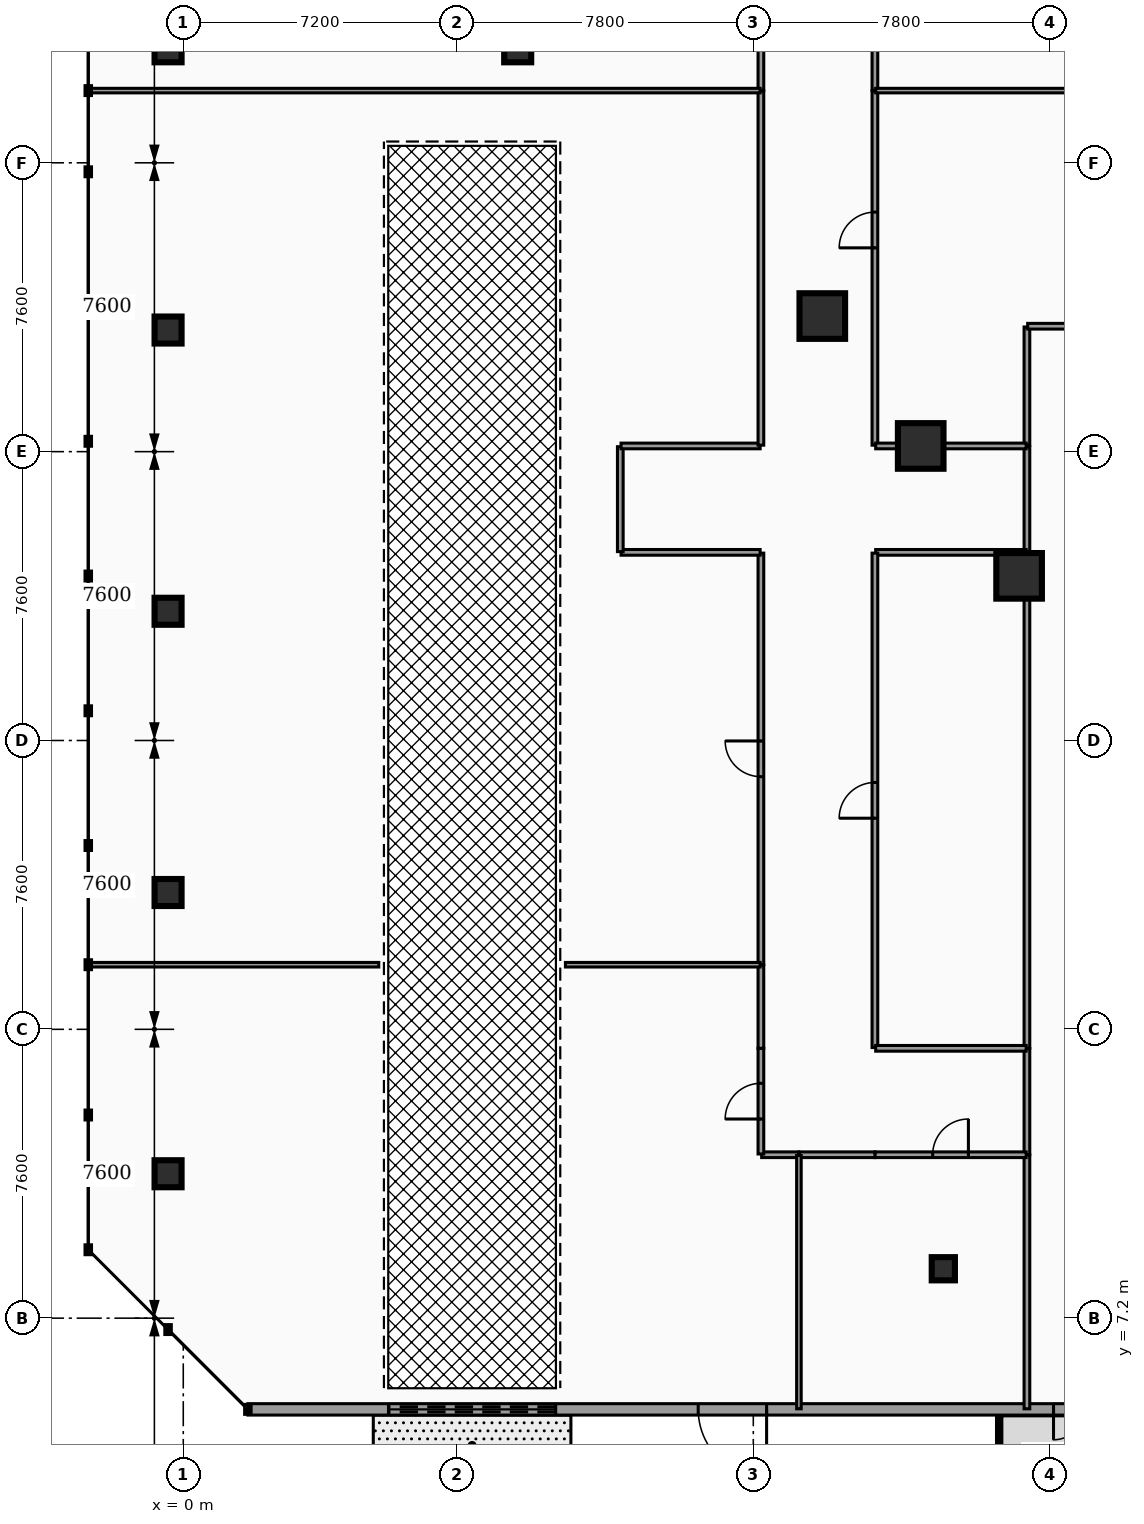
"""IFC4 building model, lengths in metres.
Left out: names, types, materials, properties, quantities, classifications, styles, units other than length and angle.
Written with IfcOpenShell. Run it as: python <this file> out.ifc"""

import sys

from ifc_helpers import new_model, si_unit, direction, frame, frame_2d, origin, origin_2d, place, context, subcontext, project, spatial, rectangle, hollow_rectangle, hollow_circle, extrude, element, fill, save


model = new_model("IFC4")
c1 = context("Model", 3, precision=1e-05, world=origin(), true_north=direction((0.0, 1.0)))
c2 = subcontext(c1, "Body", "Model", "MODEL_VIEW")
j1 = project(units=[si_unit("LENGTHUNIT", "METRE"), si_unit("PLANEANGLEUNIT", "RADIAN")], contexts=[c1])
p1 = place(None, origin())
s1 = spatial("IfcSite", under=j1, at=p1, CompositionType="ELEMENT")
p2 = place(p1, origin())
s2 = spatial("IfcBuilding", under=s1, at=p2, CompositionType="ELEMENT")
p3 = place(p2, origin())
s3 = spatial("IfcBuildingStorey", under=s2, at=p3, CompositionType="ELEMENT", Elevation=0.0)
for number, where, z_axis, x_axis in (
    (1, (16.815, 33.568, 0.0), (0.0, 0.0, 1.0), (1.0, 0.0, 0.0)),
    (2, (19.405, 30.15, 0.0), (0.0, 0.0, 1.0), (1.0, 0.0, 0.0)),
    (3, (21.994, 26.732, 0.0), (0.0, 0.0, 1.0), (1.0, 0.0, 0.0)),
):
    element("IfcColumn", number, at=place(p3, frame(where, z_axis=z_axis, x_axis=x_axis)), inside=s3, PredefinedType="COLUMN", context=c2, shape_type="SweptSolid", body=[
        extrude(hollow_rectangle(XDim=1.2, YDim=1.2, WallThickness=0.06, at=origin_2d()), origin(), (0.0, 0.0, 1.0), 4.82),
    ])
p4 = place(p3, frame((20.0, 8.5, 0.0), z_axis=(0.0, 0.0, 1.0), x_axis=(1.0, 0.0, 0.0)))
e4 = element("IfcColumn", 4, at=p4, inside=s3, PredefinedType="COLUMN", context=c2, shape_type="SweptSolid", body=[
    extrude(hollow_circle(Radius=0.305, WallThickness=0.025, at=origin_2d()), origin(), (0.0, 0.0, 1.0), 4.82),
])
for number, where, z_axis, x_axis in (
    (5, (-0.4, 40.6, 0.0), (0.0, 0.0, 1.0), (1.0, 0.0, 0.0)),
    (6, (8.8, 40.6, 0.0), (0.0, 0.0, 1.0), (1.0, 0.0, 0.0)),
    (7, (-0.4, 11.0, 0.0), (0.0, 0.0, 1.0), (1.0, 0.0, 0.0)),
    (8, (-0.4, 18.4, 0.0), (0.0, 0.0, 1.0), (1.0, 0.0, 0.0)),
    (9, (-0.4, 25.8, 0.0), (0.0, 0.0, 1.0), (1.0, 0.0, 0.0)),
    (10, (-0.4, 33.2, 0.0), (0.0, 0.0, 1.0), (1.0, 0.0, 0.0)),
):
    element("IfcColumn", number, at=place(p3, frame(where, z_axis=z_axis, x_axis=x_axis)), inside=s3, PredefinedType="COLUMN", context=c2, shape_type="SweptSolid", body=[
        extrude(hollow_circle(Radius=0.355, WallThickness=0.03, at=origin_2d()), origin(), (0.0, 0.0, 1.0), 4.82),
    ])
p5 = place(p3, frame((75.1, 4.8, 0.0), z_axis=(0.0, 0.0, 1.0), x_axis=(-1.0, 0.0, 0.0)))
e11 = element("IfcWall", 11, at=p5, inside=s3, PredefinedType="STANDARD", context=c2, shape_type="SweptSolid", body=[
    extrude(rectangle(XDim=73.4, YDim=0.3, at=frame_2d((36.7, 0.0))), origin(), (0.0, 0.0, 1.0), 4.205),
])
p6 = place(p5, frame((65.3, 0.0, 0.0)))
e12 = element("IfcOpeningElement", 12, at=p6, cuts=e11, PredefinedType="OPENING", context=c2, shape_type="SweptSolid", body=[
    extrude(rectangle(XDim=4.4, YDim=3.5, at=frame_2d((2.2, 1.75))), frame((0.0, 0.16, 0.0), z_axis=(0.0, -1.0, 0.0), x_axis=(1.0, 0.0, 0.0)), (0.0, 0.0, 1.0), 0.32),
])
p7 = place(p5, frame((31.15, 0.0, 0.0)))
e13 = element("IfcOpeningElement", 13, at=p7, cuts=e11, PredefinedType="OPENING", context=c2, shape_type="SweptSolid", body=[
    extrude(rectangle(XDim=2.4, YDim=2.6, at=frame_2d((1.2, 1.3))), frame((0.0, 0.16, 0.0), z_axis=(0.0, -1.0, 0.0), x_axis=(1.0, 0.0, 0.0)), (0.0, 0.0, 1.0), 0.32),
])
p8 = place(p5, frame((50.6, 0.0, 0.0)))
e14 = element("IfcOpeningElement", 14, at=p8, cuts=e11, PredefinedType="OPENING", context=c2, shape_type="SweptSolid", body=[
    extrude(rectangle(XDim=1.6, YDim=2.4, at=frame_2d((0.8, 1.2))), frame((0.0, 0.16, 0.0), z_axis=(0.0, -1.0, 0.0), x_axis=(1.0, 0.0, 0.0)), (0.0, 0.0, 1.0), 0.32),
])
p9 = place(p5, frame((23.0, 0.0, 0.0)))
e15 = element("IfcOpeningElement", 15, at=p9, cuts=e11, PredefinedType="OPENING", context=c2, shape_type="SweptSolid", body=[
    extrude(rectangle(XDim=1.6, YDim=2.4, at=frame_2d((0.8, 1.2))), frame((0.0, 0.16, 0.0), z_axis=(0.0, -1.0, 0.0), x_axis=(1.0, 0.0, 0.0)), (0.0, 0.0, 1.0), 0.32),
])
p10 = place(p5, frame((7.6, 0.0, 0.0)))
e16 = element("IfcOpeningElement", 16, at=p10, cuts=e11, PredefinedType="OPENING", context=c2, shape_type="SweptSolid", body=[
    extrude(rectangle(XDim=1.8, YDim=2.4, at=frame_2d((0.9, 1.2))), frame((0.0, 0.16, 0.0), z_axis=(0.0, -1.0, 0.0), x_axis=(1.0, 0.0, 0.0)), (0.0, 0.0, 1.0), 0.32),
])
p11 = place(p5, frame((17.1, 0.0, 0.0)))
e17 = element("IfcOpeningElement", 17, at=p11, cuts=e11, PredefinedType="OPENING", context=c2, shape_type="SweptSolid", body=[
    extrude(rectangle(XDim=1.8, YDim=2.4, at=frame_2d((0.9, 1.2))), frame((0.0, 0.16, 0.0), z_axis=(0.0, -1.0, 0.0), x_axis=(1.0, 0.0, 0.0)), (0.0, 0.0, 1.0), 0.32),
])
p12 = place(p5, frame((59.75, 0.0, 0.0)))
e18 = element("IfcOpeningElement", 18, at=p12, cuts=e11, PredefinedType="OPENING", context=c2, shape_type="SweptSolid", body=[
    extrude(rectangle(XDim=1.8, YDim=2.4, at=frame_2d((0.9, 1.2))), frame((0.0, 0.16, 0.0), z_axis=(0.0, -1.0, 0.0), x_axis=(1.0, 0.0, 0.0)), (0.0, 0.0, 1.0), 0.32),
])
p13 = place(p5, frame((13.6, 0.0, 0.9)))
e19 = element("IfcOpeningElement", 19, at=p13, cuts=e11, PredefinedType="OPENING", context=c2, shape_type="SweptSolid", body=[
    extrude(rectangle(XDim=2.4, YDim=2.5, at=frame_2d((1.2, 1.25))), frame((0.0, 0.16, 0.0), z_axis=(0.0, -1.0, 0.0), x_axis=(1.0, 0.0, 0.0)), (0.0, 0.0, 1.0), 0.32),
])
p14 = place(p5, frame((28.15, 0.0, 0.9)))
e20 = element("IfcOpeningElement", 20, at=p14, cuts=e11, PredefinedType="OPENING", context=c2, shape_type="SweptSolid", body=[
    extrude(rectangle(XDim=2.4, YDim=2.5, at=frame_2d((1.2, 1.25))), frame((0.0, 0.16, 0.0), z_axis=(0.0, -1.0, 0.0), x_axis=(1.0, 0.0, 0.0)), (0.0, 0.0, 1.0), 0.32),
])
p15 = place(p5, frame((44.1, 0.0, 0.9)))
e21 = element("IfcOpeningElement", 21, at=p15, cuts=e11, PredefinedType="OPENING", context=c2, shape_type="SweptSolid", body=[
    extrude(rectangle(XDim=2.4, YDim=2.5, at=frame_2d((1.2, 1.25))), frame((0.0, 0.16, 0.0), z_axis=(0.0, -1.0, 0.0), x_axis=(1.0, 0.0, 0.0)), (0.0, 0.0, 1.0), 0.32),
])
p16 = place(p3, frame((22.2, 11.505, 0.0), z_axis=(0.0, 0.0, 1.0), x_axis=(0.0, 1.0, 0.0)))
e22 = element("IfcWall", 22, at=p16, inside=s3, PredefinedType="PARTITIONING", context=c2, shape_type="SweptSolid", body=[
    extrude(rectangle(XDim=2.79, YDim=0.15, at=frame_2d((1.395, 0.0))), origin(), (0.0, 0.0, 1.0), 3.777),
])
p17 = place(p3, frame((22.2, 27.355, 0.0), z_axis=(0.0, 0.0, 1.0), x_axis=(0.0, 1.0, 0.0)))
e23 = element("IfcWall", 23, at=p17, inside=s3, PredefinedType="PARTITIONING", context=c2, shape_type="SweptSolid", body=[
    extrude(rectangle(XDim=2.775, YDim=0.15, at=frame_2d((1.387, 0.0))), origin(), (0.0, 0.0, 1.0), 3.777),
])
p18 = place(p3, frame((22.2, 30.17, 0.0), z_axis=(0.0, 0.0, 1.0), x_axis=(0.0, 1.0, 0.0)))
e24 = element("IfcWall", 24, at=p18, inside=s3, PredefinedType="PARTITIONING", context=c2, shape_type="SweptSolid", body=[
    extrude(rectangle(XDim=3.11, YDim=0.15, at=frame_2d((1.555, 0.0))), origin(), (0.0, 0.0, 1.0), 3.777),
])
p19 = place(p3, frame((22.22, 33.3, 0.0), z_axis=(0.0, 0.0, 1.0), x_axis=(1.0, 0.0, 0.0)))
e25 = element("IfcWall", 25, at=p19, inside=s3, PredefinedType="PARTITIONING", context=c2, shape_type="SweptSolid", body=[
    extrude(rectangle(XDim=2.995, YDim=0.15, at=frame_2d((1.498, 0.0))), origin(), (0.0, 0.0, 1.0), 3.777),
])
p20 = place(p3, frame((22.2, 14.305, 0.0), z_axis=(0.0, 0.0, 1.0), x_axis=(0.0, 1.0, 0.0)))
e26 = element("IfcWall", 26, at=p20, inside=s3, PredefinedType="PARTITIONING", context=c2, shape_type="SweptSolid", body=[
    extrude(rectangle(XDim=13.04, YDim=0.15, at=frame_2d((6.52, 0.0))), origin(), (0.0, 0.0, 1.0), 3.777),
])
p21 = place(p3, frame((22.2, 4.815, 0.0), z_axis=(0.0, 0.0, 1.0), x_axis=(0.0, 1.0, 0.0)))
e27 = element("IfcWall", 27, at=p21, inside=s3, PredefinedType="PARTITIONING", context=c2, shape_type="SweptSolid", body=[
    extrude(rectangle(XDim=6.68, YDim=0.15, at=frame_2d((3.34, 0.0))), origin(), (0.0, 0.0, 1.0), 3.777),
])
p22 = place(p3, frame((18.2, 30.17, 0.0), z_axis=(0.0, 0.0, 1.0), x_axis=(0.0, 1.0, 0.0)))
e28 = element("IfcWall", 28, at=p22, inside=s3, PredefinedType="PARTITIONING", context=c2, shape_type="SweptSolid", body=[
    extrude(rectangle(XDim=9.325, YDim=0.15, at=frame_2d((4.663, 0.0))), origin(), (0.0, 0.0, 1.0), 3.777),
])
p23 = place(p22, frame((5.192, 0.0, 0.0)))
e29 = element("IfcOpeningElement", 29, at=p23, cuts=e28, PredefinedType="OPENING", context=c2, shape_type="SweptSolid", body=[
    extrude(rectangle(XDim=0.94, YDim=2.05, at=frame_2d((0.47, 1.025))), frame((0.0, 0.085, 0.0), z_axis=(0.0, -1.0, 0.0), x_axis=(1.0, 0.0, 0.0)), (0.0, 0.0, 1.0), 0.17),
])
p24 = place(p3, frame((18.22, 30.15, 0.0), z_axis=(0.0, 0.0, 1.0), x_axis=(1.0, 0.0, 0.0)))
e30 = element("IfcWall", 30, at=p24, inside=s3, PredefinedType="PARTITIONING", context=c2, shape_type="SweptSolid", body=[
    extrude(rectangle(XDim=3.96, YDim=0.15, at=frame_2d((1.98, 0.0))), origin(), (0.0, 0.0, 1.0), 3.777),
])
p25 = place(p3, frame((18.2, 39.505, 0.0), z_axis=(0.0, 0.0, 1.0), x_axis=(0.0, 1.0, 0.0)))
e31 = element("IfcWall", 31, at=p25, inside=s3, PredefinedType="PARTITIONING", context=c2, shape_type="SweptSolid", body=[
    extrude(rectangle(XDim=4.025, YDim=0.15, at=frame_2d((2.013, 0.0))), origin(), (0.0, 0.0, 1.0), 3.777),
])
p26 = place(p3, frame((18.22, 27.35, 0.0), z_axis=(0.0, 0.0, 1.0), x_axis=(1.0, 0.0, 0.0)))
e32 = element("IfcWall", 32, at=p26, inside=s3, PredefinedType="PARTITIONING", context=c2, shape_type="SweptSolid", body=[
    extrude(rectangle(XDim=3.96, YDim=0.15, at=frame_2d((1.98, 0.0))), origin(), (0.0, 0.0, 1.0), 3.777),
])
p27 = place(p3, frame((18.2, 14.32, 0.0), z_axis=(0.0, 0.0, 1.0), x_axis=(0.0, 1.0, 0.0)))
e33 = element("IfcWall", 33, at=p27, inside=s3, PredefinedType="PARTITIONING", context=c2, shape_type="SweptSolid", body=[
    extrude(rectangle(XDim=13.01, YDim=0.15, at=frame_2d((6.505, 0.0))), origin(), (0.0, 0.0, 1.0), 3.777),
])
p28 = place(p27, frame((6.035, 0.0, 0.0)))
e34 = element("IfcOpeningElement", 34, at=p28, cuts=e33, PredefinedType="OPENING", context=c2, shape_type="SweptSolid", body=[
    extrude(rectangle(XDim=0.94, YDim=2.05, at=frame_2d((0.47, 1.025))), frame((0.0, 0.085, 0.0), z_axis=(0.0, -1.0, 0.0), x_axis=(1.0, 0.0, 0.0)), (0.0, 0.0, 1.0), 0.17),
])
p29 = place(p3, frame((18.22, 14.3, 0.0), z_axis=(0.0, 0.0, 1.0), x_axis=(1.0, 0.0, 0.0)))
e35 = element("IfcWall", 35, at=p29, inside=s3, PredefinedType="PARTITIONING", context=c2, shape_type="SweptSolid", body=[
    extrude(rectangle(XDim=3.96, YDim=0.15, at=frame_2d((1.98, 0.0))), origin(), (0.0, 0.0, 1.0), 3.777),
])
p30 = place(p3, frame((18.2, 11.5, 0.0), z_axis=(0.0, 0.0, 1.0), x_axis=(1.0, 0.0, 0.0)))
e36 = element("IfcWall", 36, at=p30, inside=s3, PredefinedType="PARTITIONING", context=c2, shape_type="SweptSolid", body=[
    extrude(rectangle(XDim=3.98, YDim=0.15, at=frame_2d((1.99, 0.0))), origin(), (0.0, 0.0, 1.0), 3.777),
])
p31 = place(p30, frame((1.52, 0.0, 0.0)))
e37 = element("IfcOpeningElement", 37, at=p31, cuts=e36, PredefinedType="OPENING", context=c2, shape_type="SweptSolid", body=[
    extrude(rectangle(XDim=0.94, YDim=2.05, at=frame_2d((0.47, 1.025))), frame((0.0, 0.085, 0.0), z_axis=(0.0, -1.0, 0.0), x_axis=(1.0, 0.0, 0.0)), (0.0, 0.0, 1.0), 0.17),
])
p32 = place(p3, frame((16.205, 11.5, 0.0), z_axis=(0.0, 0.0, 1.0), x_axis=(1.0, 0.0, 0.0)))
e38 = element("IfcWall", 38, at=p32, inside=s3, PredefinedType="PARTITIONING", context=c2, shape_type="SweptSolid", body=[
    extrude(rectangle(XDim=1.995, YDim=0.15, at=frame_2d((0.998, 0.0))), origin(), (0.0, 0.0, 1.0), 3.777),
])
p33 = place(p3, frame((15.22, 11.5, 0.0), z_axis=(0.0, 0.0, 1.0), x_axis=(1.0, 0.0, 0.0)))
e39 = element("IfcWall", 39, at=p33, inside=s3, PredefinedType="PARTITIONING", context=c2, shape_type="SweptSolid", body=[
    extrude(rectangle(XDim=0.975, YDim=0.15, at=frame_2d((0.488, 0.0))), origin(), (0.0, 0.0, 1.0), 3.777),
])
p34 = place(p3, frame((15.2, 11.52, 0.0), z_axis=(0.0, 0.0, 1.0), x_axis=(0.0, 1.0, 0.0)))
e40 = element("IfcWall", 40, at=p34, inside=s3, PredefinedType="PARTITIONING", context=c2, shape_type="SweptSolid", body=[
    extrude(rectangle(XDim=2.78, YDim=0.15, at=frame_2d((1.39, 0.0))), origin(), (0.0, 0.0, 1.0), 3.777),
])
p35 = place(p34, frame((0.92, 0.0, 0.0)))
e41 = element("IfcOpeningElement", 41, at=p35, cuts=e40, PredefinedType="OPENING", context=c2, shape_type="SweptSolid", body=[
    extrude(rectangle(XDim=0.94, YDim=2.05, at=frame_2d((0.47, 1.025))), frame((0.0, 0.085, 0.0), z_axis=(0.0, -1.0, 0.0), x_axis=(1.0, 0.0, 0.0)), (0.0, 0.0, 1.0), 0.17),
])
p36 = place(p3, frame((15.2, 14.3, 0.0), z_axis=(0.0, 0.0, 1.0), x_axis=(0.0, 1.0, 0.0)))
e42 = element("IfcWall", 42, at=p36, inside=s3, PredefinedType="PARTITIONING", context=c2, shape_type="SweptSolid", body=[
    extrude(rectangle(XDim=2.195, YDim=0.15, at=frame_2d((1.098, 0.0))), origin(), (0.0, 0.0, 1.0), 3.777),
])
p37 = place(p3, frame((15.2, 16.505, 0.0), z_axis=(0.0, 0.0, 1.0), x_axis=(0.0, 1.0, 0.0)))
e43 = element("IfcWall", 43, at=p37, inside=s3, PredefinedType="PARTITIONING", context=c2, shape_type="SweptSolid", body=[
    extrude(rectangle(XDim=10.825, YDim=0.15, at=frame_2d((5.413, 0.0))), origin(), (0.0, 0.0, 1.0), 3.777),
])
p38 = place(p37, frame((4.942, 0.0, 0.0)))
e44 = element("IfcOpeningElement", 44, at=p38, cuts=e43, PredefinedType="OPENING", context=c2, shape_type="SweptSolid", body=[
    extrude(rectangle(XDim=0.94, YDim=2.05, at=frame_2d((0.47, 1.025))), frame((0.0, 0.085, 0.0), z_axis=(0.0, -1.0, 0.0), x_axis=(1.0, 0.0, 0.0)), (0.0, 0.0, 1.0), 0.17),
])
p39 = place(p3, frame((11.52, 27.35, 0.0), z_axis=(0.0, 0.0, 1.0), x_axis=(1.0, 0.0, 0.0)))
e45 = element("IfcWall", 45, at=p39, inside=s3, PredefinedType="PARTITIONING", context=c2, shape_type="SweptSolid", body=[
    extrude(rectangle(XDim=3.66, YDim=0.15, at=frame_2d((1.83, 0.0))), origin(), (0.0, 0.0, 1.0), 3.777),
])
p40 = place(p3, frame((11.5, 27.37, 0.0), z_axis=(0.0, 0.0, 1.0), x_axis=(0.0, 1.0, 0.0)))
e46 = element("IfcWall", 46, at=p40, inside=s3, PredefinedType="PARTITIONING", context=c2, shape_type="SweptSolid", body=[
    extrude(rectangle(XDim=2.76, YDim=0.15, at=frame_2d((1.38, 0.0))), origin(), (0.0, 0.0, 1.0), 3.777),
])
p41 = place(p3, frame((11.52, 30.15, 0.0), z_axis=(0.0, 0.0, 1.0), x_axis=(1.0, 0.0, 0.0)))
e47 = element("IfcWall", 47, at=p41, inside=s3, PredefinedType="PARTITIONING", context=c2, shape_type="SweptSolid", body=[
    extrude(rectangle(XDim=3.66, YDim=0.15, at=frame_2d((1.83, 0.0))), origin(), (0.0, 0.0, 1.0), 3.777),
])
p42 = place(p3, frame((15.2, 30.17, 0.0), z_axis=(0.0, 0.0, 1.0), x_axis=(0.0, 1.0, 0.0)))
e48 = element("IfcWall", 48, at=p42, inside=s3, PredefinedType="PARTITIONING", context=c2, shape_type="SweptSolid", body=[
    extrude(rectangle(XDim=9.325, YDim=0.15, at=frame_2d((4.663, 0.0))), origin(), (0.0, 0.0, 1.0), 3.777),
])
p43 = place(p3, frame((15.2, 39.505, 0.0), z_axis=(0.0, 0.0, 1.0), x_axis=(0.0, 1.0, 0.0)))
e49 = element("IfcWall", 49, at=p43, inside=s3, PredefinedType="PARTITIONING", context=c2, shape_type="SweptSolid", body=[
    extrude(rectangle(XDim=4.045, YDim=0.15, at=frame_2d((2.022, 0.0))), origin(), (0.0, 0.0, 1.0), 3.777),
])
p44 = place(p43, frame((1.552, 0.0, 0.0)))
e50 = element("IfcOpeningElement", 50, at=p44, cuts=e49, PredefinedType="OPENING", context=c2, shape_type="SweptSolid", body=[
    extrude(rectangle(XDim=0.94, YDim=2.05, at=frame_2d((0.47, 1.025))), frame((0.0, 0.085, 0.0), z_axis=(0.0, -1.0, 0.0), x_axis=(1.0, 0.0, 0.0)), (0.0, 0.0, 1.0), 0.17),
])
p45 = place(p3, frame((18.22, 39.5, 0.0), z_axis=(0.0, 0.0, 1.0), x_axis=(1.0, 0.0, 0.0)))
e51 = element("IfcWall", 51, at=p45, inside=s3, PredefinedType="PARTITIONING", context=c2, shape_type="SweptSolid", body=[
    extrude(rectangle(XDim=6.995, YDim=0.12, at=frame_2d((3.498, 0.0))), origin(), (0.0, 0.0, 1.0), 3.777),
])
p46 = place(p3, frame((16.2, 4.815, 0.0), z_axis=(0.0, 0.0, 1.0), x_axis=(0.0, 1.0, 0.0)))
e52 = element("IfcWall", 52, at=p46, inside=s3, PredefinedType="PARTITIONING", context=c2, shape_type="SweptSolid", body=[
    extrude(rectangle(XDim=6.665, YDim=0.12, at=frame_2d((3.333, 0.0))), origin(), (0.0, 0.0, 1.0), 3.777),
])
p47 = place(p3, frame((-2.485, 16.5, 0.0), z_axis=(0.0, 0.0, 1.0), x_axis=(1.0, 0.0, 0.0)))
e53 = element("IfcWall", 53, at=p47, inside=s3, PredefinedType="PARTITIONING", context=c2, shape_type="SweptSolid", body=[
    extrude(rectangle(XDim=7.629, YDim=0.12, at=frame_2d((3.814, 0.0))), origin(), (0.0, 0.0, 1.0), 3.777),
])
p48 = place(p3, frame((10.056, 16.5, 0.0), z_axis=(0.0, 0.0, 1.0), x_axis=(1.0, 0.0, 0.0)))
e54 = element("IfcWall", 54, at=p48, inside=s3, PredefinedType="PARTITIONING", context=c2, shape_type="SweptSolid", body=[
    extrude(rectangle(XDim=5.124, YDim=0.12, at=frame_2d((2.562, 0.0))), origin(), (0.0, 0.0, 1.0), 3.777),
])
p49 = place(p3, frame((-2.485, 39.5, 0.0), z_axis=(0.0, 0.0, 1.0), x_axis=(1.0, 0.0, 0.0)))
e55 = element("IfcWall", 55, at=p49, inside=s3, PredefinedType="PARTITIONING", context=c2, shape_type="SweptSolid", body=[
    extrude(rectangle(XDim=17.665, YDim=0.12, at=frame_2d((8.833, 0.0))), origin(), (0.0, 0.0, 1.0), 3.777),
])
p50 = place(p6, origin())
e56 = element("IfcDoor", 56, at=p50, inside=s3, OperationType="ROLLINGUP", PredefinedType="GATE", context=c2, shape_type="SweptSolid", body=[
    extrude(rectangle(XDim=4.4, YDim=3.5, at=frame_2d((2.2, 1.75))), frame((0.0, 0.025, 0.0), z_axis=(0.0, -1.0, 0.0), x_axis=(1.0, 0.0, 0.0)), (0.0, 0.0, 1.0), 0.05),
])
fill(e12, e56)
p51 = place(p8, origin())
e57 = element("IfcDoor", 57, at=p51, inside=s3, OperationType="DOUBLE_DOOR_SINGLE_SWING", PredefinedType="DOOR", context=c2, shape_type="SweptSolid", body=[
    extrude(rectangle(XDim=1.6, YDim=2.4, at=frame_2d((0.8, 1.2))), frame((0.0, 0.025, 0.0), z_axis=(0.0, -1.0, 0.0), x_axis=(1.0, 0.0, 0.0)), (0.0, 0.0, 1.0), 0.05),
])
fill(e14, e57)
p52 = place(p12, origin())
e58 = element("IfcDoor", 58, at=p52, inside=s3, OperationType="SINGLE_SWING_LEFT", PredefinedType="DOOR", context=c2, shape_type="SweptSolid", body=[
    extrude(rectangle(XDim=1.8, YDim=2.4, at=frame_2d((0.9, 1.2))), frame((0.0, 0.025, 0.0), z_axis=(0.0, -1.0, 0.0), x_axis=(1.0, 0.0, 0.0)), (0.0, 0.0, 1.0), 0.05),
])
fill(e18, e58)
p53 = place(p23, origin())
e59 = element("IfcDoor", 59, at=p53, inside=s3, OperationType="SINGLE_SWING_LEFT", PredefinedType="DOOR", context=c2, shape_type="SweptSolid", body=[
    extrude(rectangle(XDim=0.94, YDim=2.05, at=frame_2d((0.47, 1.025))), frame((0.0, 0.025, 0.0), z_axis=(0.0, -1.0, 0.0), x_axis=(1.0, 0.0, 0.0)), (0.0, 0.0, 1.0), 0.05),
])
fill(e29, e59)
p54 = place(p28, origin())
e60 = element("IfcDoor", 60, at=p54, inside=s3, OperationType="SINGLE_SWING_LEFT", PredefinedType="DOOR", context=c2, shape_type="SweptSolid", body=[
    extrude(rectangle(XDim=0.94, YDim=2.05, at=frame_2d((0.47, 1.025))), frame((0.0, 0.025, 0.0), z_axis=(0.0, -1.0, 0.0), x_axis=(1.0, 0.0, 0.0)), (0.0, 0.0, 1.0), 0.05),
])
fill(e34, e60)
p55 = place(p31, origin())
e61 = element("IfcDoor", 61, at=p55, inside=s3, OperationType="SINGLE_SWING_RIGHT", PredefinedType="DOOR", context=c2, shape_type="SweptSolid", body=[
    extrude(rectangle(XDim=0.94, YDim=2.05, at=frame_2d((0.47, 1.025))), frame((0.0, 0.025, 0.0), z_axis=(0.0, -1.0, 0.0), x_axis=(1.0, 0.0, 0.0)), (0.0, 0.0, 1.0), 0.05),
])
fill(e37, e61)
p56 = place(p35, origin())
e62 = element("IfcDoor", 62, at=p56, inside=s3, OperationType="SINGLE_SWING_LEFT", PredefinedType="DOOR", context=c2, shape_type="SweptSolid", body=[
    extrude(rectangle(XDim=0.94, YDim=2.05, at=frame_2d((0.47, 1.025))), frame((0.0, 0.025, 0.0), z_axis=(0.0, -1.0, 0.0), x_axis=(1.0, 0.0, 0.0)), (0.0, 0.0, 1.0), 0.05),
])
fill(e41, e62)
p57 = place(p38, origin())
e63 = element("IfcDoor", 63, at=p57, inside=s3, OperationType="SINGLE_SWING_RIGHT", PredefinedType="DOOR", context=c2, shape_type="SweptSolid", body=[
    extrude(rectangle(XDim=0.94, YDim=2.05, at=frame_2d((0.47, 1.025))), frame((0.0, 0.025, 0.0), z_axis=(0.0, -1.0, 0.0), x_axis=(1.0, 0.0, 0.0)), (0.0, 0.0, 1.0), 0.05),
])
fill(e44, e63)
save(model, sys.argv[1])
